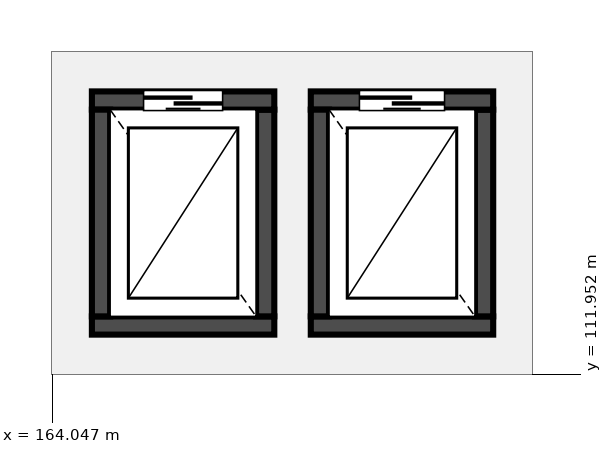
"""IFC4 building model, lengths in metres.
Left out: names, types, materials, properties, quantities, classifications, styles, units other than length and angle.
Written with IfcOpenShell. Run it as: python <this file> out.ifc"""

import sys

from ifc_helpers import new_model, si_unit, direction, frame, frame_2d, origin, place, context, subcontext, project, spatial, rectangle, extrude, element, fill, save


model = new_model("IFC4")
c1 = context("Model", 3, precision=1e-05, world=origin(), true_north=direction((0.0, 1.0)))
c2 = subcontext(c1, "Body", "Model", "MODEL_VIEW")
j1 = project(units=[si_unit("LENGTHUNIT", "METRE"), si_unit("PLANEANGLEUNIT", "RADIAN")], contexts=[c1])
p1 = place(None, origin())
s1 = spatial("IfcSite", under=j1, at=p1, CompositionType="ELEMENT")
p2 = place(p1, origin())
s2 = spatial("IfcBuilding", under=s1, at=p2, CompositionType="ELEMENT")
p3 = place(p2, frame((0.0, 0.0, 9.9)))
s3 = spatial("IfcBuildingStorey", under=s2, at=p3, CompositionType="ELEMENT", Elevation=9.9)
p4 = place(p3, frame((164.7, 112.75, 0.0), z_axis=(0.0, 0.0, 1.0), x_axis=(1.0, 0.0, 0.0)))
e1 = element("IfcWall", 1, at=p4, inside=s3, PredefinedType="SHEAR", context=c2, shape_type="SweptSolid", body=[
    extrude(rectangle(XDim=3.0, YDim=0.3, at=frame_2d((1.5, 0.0))), origin(), (0.0, 0.0, 1.0), 3.6),
])
p5 = place(p3, frame((167.55, 112.9, 0.0), z_axis=(0.0, 0.0, 1.0), x_axis=(0.0, 1.0, 0.0)))
e2 = element("IfcWall", 2, at=p5, inside=s3, PredefinedType="SHEAR", context=c2, shape_type="SweptSolid", body=[
    extrude(rectangle(XDim=3.4, YDim=0.3, at=frame_2d((1.7, 0.0))), origin(), (0.0, 0.0, 1.0), 3.6),
])
p6 = place(p3, frame((167.7, 116.45, 0.0), z_axis=(0.0, 0.0, 1.0), x_axis=(-1.0, 0.0, 0.0)))
e3 = element("IfcWall", 3, at=p6, inside=s3, PredefinedType="SHEAR", context=c2, shape_type="SweptSolid", body=[
    extrude(rectangle(XDim=3.0, YDim=0.3, at=frame_2d((1.5, 0.0))), origin(), (0.0, 0.0, 1.0), 3.6),
])
p7 = place(p6, frame((0.85, 0.0, 0.0)))
e4 = element("IfcOpeningElement", 4, at=p7, cuts=e3, PredefinedType="OPENING", context=c2, shape_type="SweptSolid", body=[
    extrude(rectangle(XDim=1.3, YDim=2.3, at=frame_2d((0.65, 1.15))), frame((0.0, 0.16, 0.0), z_axis=(0.0, -1.0, 0.0), x_axis=(1.0, 0.0, 0.0)), (0.0, 0.0, 1.0), 0.32),
])
p8 = place(p3, frame((164.85, 116.3, 0.0), z_axis=(0.0, 0.0, 1.0), x_axis=(0.0, -1.0, 0.0)))
e5 = element("IfcWall", 5, at=p8, inside=s3, PredefinedType="SHEAR", context=c2, shape_type="SweptSolid", body=[
    extrude(rectangle(XDim=3.4, YDim=0.3, at=frame_2d((1.7, 0.0))), origin(), (0.0, 0.0, 1.0), 3.6),
])
p9 = place(p3, frame((168.3, 112.75, 0.0), z_axis=(0.0, 0.0, 1.0), x_axis=(1.0, 0.0, 0.0)))
e6 = element("IfcWall", 6, at=p9, inside=s3, PredefinedType="SHEAR", context=c2, shape_type="SweptSolid", body=[
    extrude(rectangle(XDim=3.0, YDim=0.3, at=frame_2d((1.5, 0.0))), origin(), (0.0, 0.0, 1.0), 3.6),
])
p10 = place(p3, frame((171.15, 112.9, 0.0), z_axis=(0.0, 0.0, 1.0), x_axis=(0.0, 1.0, 0.0)))
e7 = element("IfcWall", 7, at=p10, inside=s3, PredefinedType="SHEAR", context=c2, shape_type="SweptSolid", body=[
    extrude(rectangle(XDim=3.4, YDim=0.3, at=frame_2d((1.7, 0.0))), origin(), (0.0, 0.0, 1.0), 3.6),
])
p11 = place(p3, frame((171.3, 116.45, 0.0), z_axis=(0.0, 0.0, 1.0), x_axis=(-1.0, 0.0, 0.0)))
e8 = element("IfcWall", 8, at=p11, inside=s3, PredefinedType="SHEAR", context=c2, shape_type="SweptSolid", body=[
    extrude(rectangle(XDim=3.0, YDim=0.3, at=frame_2d((1.5, 0.0))), origin(), (0.0, 0.0, 1.0), 3.6),
])
p12 = place(p11, frame((0.8, 0.0, 0.0)))
e9 = element("IfcOpeningElement", 9, at=p12, cuts=e8, PredefinedType="OPENING", context=c2, shape_type="SweptSolid", body=[
    extrude(rectangle(XDim=1.4, YDim=2.3, at=frame_2d((0.7, 1.15))), frame((0.0, 0.16, 0.0), z_axis=(0.0, -1.0, 0.0), x_axis=(1.0, 0.0, 0.0)), (0.0, 0.0, 1.0), 0.32),
])
p13 = place(p3, frame((168.45, 116.3, 0.0), z_axis=(0.0, 0.0, 1.0), x_axis=(0.0, -1.0, 0.0)))
e10 = element("IfcWall", 10, at=p13, inside=s3, PredefinedType="SHEAR", context=c2, shape_type="SweptSolid", body=[
    extrude(rectangle(XDim=3.4, YDim=0.3, at=frame_2d((1.7, 0.0))), origin(), (0.0, 0.0, 1.0), 3.6),
])
p14 = place(p7, origin())
e11 = element("IfcDoor", 11, at=p14, inside=s3, OperationType="SLIDING_TO_LEFT", PredefinedType="DOOR", context=c2, shape_type="SweptSolid", body=[
    extrude(rectangle(XDim=1.3, YDim=2.3, at=frame_2d((0.65, 1.15))), frame((0.0, 0.025, 0.0), z_axis=(0.0, -1.0, 0.0), x_axis=(1.0, 0.0, 0.0)), (0.0, 0.0, 1.0), 0.05),
])
fill(e4, e11)
p15 = place(p12, origin())
e12 = element("IfcDoor", 12, at=p15, inside=s3, OperationType="SLIDING_TO_RIGHT", PredefinedType="DOOR", context=c2, shape_type="SweptSolid", body=[
    extrude(rectangle(XDim=1.4, YDim=2.3, at=frame_2d((0.7, 1.15))), frame((0.0, 0.025, 0.0), z_axis=(0.0, -1.0, 0.0), x_axis=(1.0, 0.0, 0.0)), (0.0, 0.0, 1.0), 0.05),
])
fill(e9, e12)
save(model, sys.argv[1])
